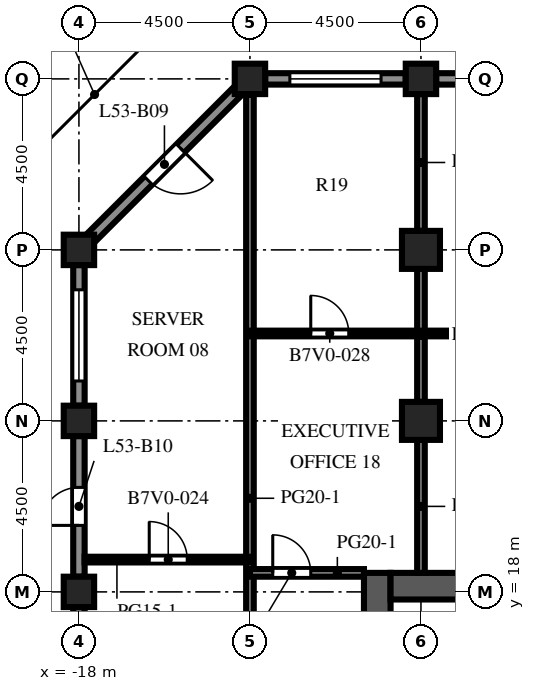
"""IFC4 building model, lengths in metres.
Left out: names, types, materials, properties, quantities, classifications, styles, units other than length and angle.
Written with IfcOpenShell. Run it as: python <this file> out.ifc"""

import sys

from ifc_helpers import new_model, si_unit, direction, frame, frame_2d, origin, origin_2d, place, context, subcontext, project, spatial, rectangle, extrude, element, fill, save


model = new_model("IFC4")
c1 = context("Model", 3, precision=1e-05, world=origin(), true_north=direction((0.0, 1.0)))
c2 = subcontext(c1, "Body", "Model", "MODEL_VIEW")
j1 = project(units=[si_unit("LENGTHUNIT", "METRE"), si_unit("PLANEANGLEUNIT", "RADIAN")], contexts=[c1])
p1 = place(None, origin())
s1 = spatial("IfcSite", under=j1, at=p1, CompositionType="ELEMENT")
p2 = place(p1, origin())
s2 = spatial("IfcBuilding", under=s1, at=p2, CompositionType="ELEMENT")
p3 = place(p2, frame((0.0, 0.0, 235.7)))
s3 = spatial("IfcBuildingStorey", under=s2, at=p3, CompositionType="ELEMENT", Elevation=235.7)
for number, where, z_axis, x_axis in (
    (1, (-18.0, 18.0, 0.0), (0.0, 0.0, 1.0), (1.0, 0.0, 0.0)),
    (2, (-18.0, 22.5, 0.0), (0.0, 0.0, 1.0), (1.0, 0.0, 0.0)),
    (3, (-18.0, 27.0, 0.0), (0.0, 0.0, 1.0), (1.0, 0.0, 0.0)),
    (4, (-13.5, 31.5, 0.0), (0.0, 0.0, 1.0), (1.0, 0.0, 0.0)),
    (5, (-9.0, 31.5, 0.0), (0.0, 0.0, 1.0), (1.0, 0.0, 0.0)),
):
    element("IfcColumn", number, at=place(p3, frame(where, z_axis=z_axis, x_axis=x_axis)), inside=s3, PredefinedType="COLUMN", context=c2, shape_type="SweptSolid", body=[
        extrude(rectangle(XDim=0.8, YDim=0.8, at=origin_2d()), origin(), (0.0, 0.0, 1.0), 4.1),
    ])
for number, where, z_axis, x_axis in (
    (6, (-9.0, 22.5, 0.0), (0.0, 0.0, 1.0), (1.0, 0.0, 0.0)),
    (7, (-9.0, 27.0, 0.0), (0.0, 0.0, 1.0), (1.0, 0.0, 0.0)),
):
    element("IfcColumn", number, at=place(p3, frame(where, z_axis=z_axis, x_axis=x_axis)), inside=s3, PredefinedType="COLUMN", context=c2, shape_type="SweptSolid", body=[
        extrude(rectangle(XDim=1.0, YDim=1.0, at=origin_2d()), origin(), (0.0, 0.0, 1.0), 4.1),
    ])
p4 = place(p3, frame((-10.15, -9.0, 0.0), z_axis=(0.0, 0.0, 1.0), x_axis=(0.0, 1.0, 0.0)))
e8 = element("IfcWall", 8, at=p4, inside=s3, PredefinedType="SHEAR", context=c2, shape_type="SweptSolid", body=[
    extrude(rectangle(XDim=27.5, YDim=0.7, at=frame_2d((13.75, 0.0))), origin(), (0.0, 0.0, 1.0), 4.1),
])
p5 = place(p4, frame((12.55, 0.0, 0.0)))
e9 = element("IfcOpeningElement", 9, at=p5, cuts=e8, PredefinedType="OPENING", context=c2, shape_type="SweptSolid", body=[
    extrude(rectangle(XDim=2.4, YDim=2.4, at=frame_2d((1.2, 1.2))), frame((0.0, 0.36, 0.0), z_axis=(0.0, -1.0, 0.0), x_axis=(1.0, 0.0, 0.0)), (0.0, 0.0, 1.0), 0.72),
])
p6 = place(p4, frame((6.825, 0.0, 0.0)))
e10 = element("IfcOpeningElement", 10, at=p6, cuts=e8, PredefinedType="OPENING", context=c2, shape_type="SweptSolid", body=[
    extrude(rectangle(XDim=1.2, YDim=2.1, at=frame_2d((0.6, 1.05))), frame((0.0, 0.36, 0.0), z_axis=(0.0, -1.0, 0.0), x_axis=(1.0, 0.0, 0.0)), (0.0, 0.0, 1.0), 0.72),
])
p7 = place(p4, frame((19.475, 0.0, 0.0)))
e11 = element("IfcOpeningElement", 11, at=p7, cuts=e8, PredefinedType="OPENING", context=c2, shape_type="SweptSolid", body=[
    extrude(rectangle(XDim=1.2, YDim=2.1, at=frame_2d((0.6, 1.05))), frame((0.0, 0.36, 0.0), z_axis=(0.0, -1.0, 0.0), x_axis=(1.0, 0.0, 0.0)), (0.0, 0.0, 1.0), 0.72),
])
p8 = place(p3, frame((-9.8, 18.15, 0.0), z_axis=(0.0, 0.0, 1.0), x_axis=(1.0, 0.0, 0.0)))
e12 = element("IfcWall", 12, at=p8, inside=s3, PredefinedType="SHEAR", context=c2, shape_type="SweptSolid", body=[
    extrude(rectangle(XDim=10.6, YDim=0.7, at=frame_2d((5.3, 0.0))), origin(), (0.0, 0.0, 1.0), 4.1),
])
p9 = place(p3, frame((-8.6, 31.5, 0.0), z_axis=(0.0, 0.0, 1.0), x_axis=(1.0, 0.0, 0.0)))
e13 = element("IfcWall", 13, at=p9, inside=s3, PredefinedType="SOLIDWALL", context=c2, shape_type="SweptSolid", body=[
    extrude(rectangle(XDim=3.7, YDim=0.3, at=frame_2d((1.85, 0.0))), origin(), (0.0, 0.0, 1.0), 2.85),
])
p10 = place(p9, frame((1.35, 0.0, 0.0)))
e14 = element("IfcOpeningElement", 14, at=p10, cuts=e13, PredefinedType="OPENING", context=c2, shape_type="SweptSolid", body=[
    extrude(rectangle(XDim=1.0, YDim=2.2, at=frame_2d((0.5, 1.1))), frame((0.0, 0.16, 0.0), z_axis=(0.0, -1.0, 0.0), x_axis=(1.0, 0.0, 0.0)), (0.0, 0.0, 1.0), 0.32),
])
p11 = place(p3, frame((-13.1, 31.5, 0.0), z_axis=(0.0, 0.0, 1.0), x_axis=(1.0, 0.0, 0.0)))
e15 = element("IfcWall", 15, at=p11, inside=s3, PredefinedType="SOLIDWALL", context=c2, shape_type="SweptSolid", body=[
    extrude(rectangle(XDim=3.7, YDim=0.3, at=frame_2d((1.85, 0.0))), origin(), (0.0, 0.0, 1.0), 2.85),
])
p12 = place(p11, frame((0.65, 0.0, 0.8)))
e16 = element("IfcOpeningElement", 16, at=p12, cuts=e15, PredefinedType="OPENING", context=c2, shape_type="SweptSolid", body=[
    extrude(rectangle(XDim=2.4, YDim=1.7, at=frame_2d((1.2, 0.85))), frame((0.0, 0.16, 0.0), z_axis=(0.0, -1.0, 0.0), x_axis=(1.0, 0.0, 0.0)), (0.0, 0.0, 1.0), 0.32),
])
p13 = place(p3, frame((-17.706, 27.294, 0.0), z_axis=(0.0, 0.0, 1.0), x_axis=(0.707106781187, 0.707106781187, 0.0)))
e17 = element("IfcWall", 17, at=p13, inside=s3, PredefinedType="SOLIDWALL", context=c2, shape_type="SweptSolid", body=[
    extrude(rectangle(XDim=5.532, YDim=0.3, at=frame_2d((2.766, 0.0))), origin(), (0.0, 0.0, 1.0), 2.85),
])
p14 = place(p13, frame((2.166, 0.0, 0.0)))
e18 = element("IfcOpeningElement", 18, at=p14, cuts=e17, PredefinedType="OPENING", context=c2, shape_type="SweptSolid", body=[
    extrude(rectangle(XDim=1.2, YDim=2.2, at=frame_2d((0.6, 1.1))), frame((0.0, 0.16, 0.0), z_axis=(0.0, -1.0, 0.0), x_axis=(1.0, 0.0, 0.0)), (0.0, 0.0, 1.0), 0.32),
])
p15 = place(p3, frame((-18.0, 22.9, 0.0), z_axis=(0.0, 0.0, 1.0), x_axis=(0.0, 1.0, 0.0)))
e19 = element("IfcWall", 19, at=p15, inside=s3, PredefinedType="SOLIDWALL", context=c2, shape_type="SweptSolid", body=[
    extrude(rectangle(XDim=3.7, YDim=0.3, at=frame_2d((1.85, 0.0))), origin(), (0.0, 0.0, 1.0), 2.85),
])
p16 = place(p15, frame((0.65, 0.0, 0.8)))
e20 = element("IfcOpeningElement", 20, at=p16, cuts=e19, PredefinedType="OPENING", context=c2, shape_type="SweptSolid", body=[
    extrude(rectangle(XDim=2.4, YDim=1.7, at=frame_2d((1.2, 0.85))), frame((0.0, 0.16, 0.0), z_axis=(0.0, -1.0, 0.0), x_axis=(1.0, 0.0, 0.0)), (0.0, 0.0, 1.0), 0.32),
])
p17 = place(p3, frame((-18.0, 18.4, 0.0), z_axis=(0.0, 0.0, 1.0), x_axis=(0.0, 1.0, 0.0)))
e21 = element("IfcWall", 21, at=p17, inside=s3, PredefinedType="SOLIDWALL", context=c2, shape_type="SweptSolid", body=[
    extrude(rectangle(XDim=3.7, YDim=0.3, at=frame_2d((1.85, 0.0))), origin(), (0.0, 0.0, 1.0), 2.85),
])
p18 = place(p17, frame((1.35, 0.0, 0.0)))
e22 = element("IfcOpeningElement", 22, at=p18, cuts=e21, PredefinedType="OPENING", context=c2, shape_type="SweptSolid", body=[
    extrude(rectangle(XDim=1.0, YDim=2.2, at=frame_2d((0.5, 1.1))), frame((0.0, 0.16, 0.0), z_axis=(0.0, -1.0, 0.0), x_axis=(1.0, 0.0, 0.0)), (0.0, 0.0, 1.0), 0.32),
])
p19 = place(p3, frame((-18.0, 13.9, 0.0), z_axis=(0.0, 0.0, 1.0), x_axis=(0.0, 1.0, 0.0)))
e23 = element("IfcWall", 23, at=p19, inside=s3, PredefinedType="SOLIDWALL", context=c2, shape_type="SweptSolid", body=[
    extrude(rectangle(XDim=3.7, YDim=0.3, at=frame_2d((1.85, 0.0))), origin(), (0.0, 0.0, 1.0), 2.85),
])
p20 = place(p19, frame((0.65, 0.0, 0.8)))
e24 = element("IfcOpeningElement", 24, at=p20, cuts=e23, PredefinedType="OPENING", context=c2, shape_type="SweptSolid", body=[
    extrude(rectangle(XDim=2.4, YDim=1.7, at=frame_2d((1.2, 0.85))), frame((0.0, 0.16, 0.0), z_axis=(0.0, -1.0, 0.0), x_axis=(1.0, 0.0, 0.0)), (0.0, 0.0, 1.0), 0.32),
])
p21 = place(p3, frame((-13.5, 6.25, 0.0), z_axis=(0.0, 0.0, 1.0), x_axis=(0.0, 1.0, 0.0)))
e25 = element("IfcWall", 25, at=p21, inside=s3, PredefinedType="PARTITIONING", context=c2, shape_type="SweptSolid", body=[
    extrude(rectangle(XDim=24.827, YDim=0.2, at=frame_2d((12.414, 0.0))), origin(), (0.0, 0.0, 1.0), 3.65),
])
p22 = place(p21, frame((2.6, 0.0, 0.0)))
e26 = element("IfcOpeningElement", 26, at=p22, cuts=e25, PredefinedType="OPENING", context=c2, shape_type="SweptSolid", body=[
    extrude(rectangle(XDim=1.0, YDim=2.1, at=frame_2d((0.5, 1.05))), frame((0.0, 0.11, 0.0), z_axis=(0.0, -1.0, 0.0), x_axis=(1.0, 0.0, 0.0)), (0.0, 0.0, 1.0), 0.22),
])
for number, where, z_axis, x_axis in (
    (27, (-9.0, 18.5, 0.0), (0.0, 0.0, 1.0), (0.0, 1.0, 0.0)),
    (28, (-9.0, 23.0, 0.0), (0.0, 0.0, 1.0), (0.0, 1.0, 0.0)),
):
    element("IfcWall", number, at=place(p3, frame(where, z_axis=z_axis, x_axis=x_axis)), inside=s3, PredefinedType="PARTITIONING", context=c2, shape_type="SweptSolid", body=[
        extrude(rectangle(XDim=3.5, YDim=0.2, at=frame_2d((1.75, 0.0))), origin(), (0.0, 0.0, 1.0), 3.65),
    ])
p23 = place(p3, frame((-9.0, 27.5, 0.0), z_axis=(0.0, 0.0, 1.0), x_axis=(0.0, 1.0, 0.0)))
e29 = element("IfcWall", 29, at=p23, inside=s3, PredefinedType="PARTITIONING", context=c2, shape_type="SweptSolid", body=[
    extrude(rectangle(XDim=3.6, YDim=0.2, at=frame_2d((1.8, 0.0))), origin(), (0.0, 0.0, 1.0), 3.65),
])
p24 = place(p3, frame((-13.5, 18.5, 0.0), z_axis=(0.0, 0.0, 1.0), x_axis=(1.0, 0.0, 0.0)))
e30 = element("IfcWall", 30, at=p24, inside=s3, PredefinedType="PARTITIONING", context=c2, shape_type="SweptSolid", body=[
    extrude(rectangle(XDim=3.0, YDim=0.2, at=frame_2d((1.5, 0.0))), origin(), (0.0, 0.0, 1.0), 3.65),
])
p25 = place(p24, frame((0.6, 0.0, 0.0)))
e31 = element("IfcOpeningElement", 31, at=p25, cuts=e30, PredefinedType="OPENING", context=c2, shape_type="SweptSolid", body=[
    extrude(rectangle(XDim=1.0, YDim=2.1, at=frame_2d((0.5, 1.05))), frame((0.0, 0.11, 0.0), z_axis=(0.0, -1.0, 0.0), x_axis=(1.0, 0.0, 0.0)), (0.0, 0.0, 1.0), 0.22),
])
p26 = place(p3, frame((-17.85, 18.85, 0.0), z_axis=(0.0, 0.0, 1.0), x_axis=(1.0, 0.0, 0.0)))
e32 = element("IfcWall", 32, at=p26, inside=s3, PredefinedType="PARTITIONING", context=c2, shape_type="SweptSolid", body=[
    extrude(rectangle(XDim=4.35, YDim=0.15, at=frame_2d((2.175, 0.0))), origin(), (0.0, 0.0, 1.0), 3.65),
])
p27 = place(p26, frame((1.7, 0.0, 0.0)))
e33 = element("IfcOpeningElement", 33, at=p27, cuts=e32, PredefinedType="OPENING", context=c2, shape_type="SweptSolid", body=[
    extrude(rectangle(XDim=1.0, YDim=2.1, at=frame_2d((0.5, 1.05))), frame((0.0, 0.085, 0.0), z_axis=(0.0, -1.0, 0.0), x_axis=(1.0, 0.0, 0.0)), (0.0, 0.0, 1.0), 0.17),
])
p28 = place(p3, frame((-13.5, 24.8, 0.0), z_axis=(0.0, 0.0, 1.0), x_axis=(1.0, 0.0, 0.0)))
e34 = element("IfcWall", 34, at=p28, inside=s3, PredefinedType="PARTITIONING", context=c2, shape_type="SweptSolid", body=[
    extrude(rectangle(XDim=34.5, YDim=0.15, at=frame_2d((17.25, 0.0))), origin(), (0.0, 0.0, 1.0), 3.65),
])
p29 = place(p28, frame((1.6, 0.0, 0.0)))
e35 = element("IfcOpeningElement", 35, at=p29, cuts=e34, PredefinedType="OPENING", context=c2, shape_type="SweptSolid", body=[
    extrude(rectangle(XDim=1.0, YDim=2.1, at=frame_2d((0.5, 1.05))), frame((0.0, 0.085, 0.0), z_axis=(0.0, -1.0, 0.0), x_axis=(1.0, 0.0, 0.0)), (0.0, 0.0, 1.0), 0.17),
])
p30 = place(p28, frame((10.35, 0.0, 0.0)))
e36 = element("IfcOpeningElement", 36, at=p30, cuts=e34, PredefinedType="OPENING", context=c2, shape_type="SweptSolid", body=[
    extrude(rectangle(XDim=1.0, YDim=2.1, at=frame_2d((0.5, 1.05))), frame((0.0, 0.085, 0.0), z_axis=(0.0, -1.0, 0.0), x_axis=(1.0, 0.0, 0.0)), (0.0, 0.0, 1.0), 0.17),
])
p31 = place(p28, frame((22.35, 0.0, 0.0)))
e37 = element("IfcOpeningElement", 37, at=p31, cuts=e34, PredefinedType="OPENING", context=c2, shape_type="SweptSolid", body=[
    extrude(rectangle(XDim=1.0, YDim=2.1, at=frame_2d((0.5, 1.05))), frame((0.0, 0.085, 0.0), z_axis=(0.0, -1.0, 0.0), x_axis=(1.0, 0.0, 0.0)), (0.0, 0.0, 1.0), 0.17),
])
p32 = place(p28, frame((31.1, 0.0, 0.0)))
e38 = element("IfcOpeningElement", 38, at=p32, cuts=e34, PredefinedType="OPENING", context=c2, shape_type="SweptSolid", body=[
    extrude(rectangle(XDim=1.0, YDim=2.1, at=frame_2d((0.5, 1.05))), frame((0.0, 0.085, 0.0), z_axis=(0.0, -1.0, 0.0), x_axis=(1.0, 0.0, 0.0)), (0.0, 0.0, 1.0), 0.17),
])
p33 = place(p12, origin())
e39 = element("IfcWindow", 39, at=p33, inside=s3, PartitioningType="SINGLE_PANEL", PredefinedType="WINDOW", context=c2, shape_type="SweptSolid", body=[
    extrude(rectangle(XDim=2.4, YDim=1.7, at=frame_2d((1.2, 0.85))), frame((0.0, 0.03, 0.0), z_axis=(0.0, -1.0, 0.0), x_axis=(1.0, 0.0, 0.0)), (0.0, 0.0, 1.0), 0.06),
])
fill(e16, e39)
p34 = place(p14, origin())
e40 = element("IfcDoor", 40, at=p34, inside=s3, OperationType="SINGLE_SWING_RIGHT", PredefinedType="DOOR", context=c2, shape_type="SweptSolid", body=[
    extrude(rectangle(XDim=1.2, YDim=2.2, at=frame_2d((0.6, 1.1))), frame((0.0, 0.025, 0.0), z_axis=(0.0, -1.0, 0.0), x_axis=(1.0, 0.0, 0.0)), (0.0, 0.0, 1.0), 0.05),
])
fill(e18, e40)
p35 = place(p16, origin())
e41 = element("IfcWindow", 41, at=p35, inside=s3, PartitioningType="SINGLE_PANEL", PredefinedType="WINDOW", context=c2, shape_type="SweptSolid", body=[
    extrude(rectangle(XDim=2.4, YDim=1.7, at=frame_2d((1.2, 0.85))), frame((0.0, 0.03, 0.0), z_axis=(0.0, -1.0, 0.0), x_axis=(1.0, 0.0, 0.0)), (0.0, 0.0, 1.0), 0.06),
])
fill(e20, e41)
p36 = place(p18, origin())
e42 = element("IfcDoor", 42, at=p36, inside=s3, OperationType="SINGLE_SWING_LEFT", PredefinedType="DOOR", context=c2, shape_type="SweptSolid", body=[
    extrude(rectangle(XDim=1.0, YDim=2.2, at=frame_2d((0.5, 1.1))), frame((0.0, 0.025, 0.0), z_axis=(0.0, -1.0, 0.0), x_axis=(1.0, 0.0, 0.0)), (0.0, 0.0, 1.0), 0.05),
])
fill(e22, e42)
p37 = place(p25, origin())
e43 = element("IfcDoor", 43, at=p37, inside=s3, OperationType="SINGLE_SWING_LEFT", PredefinedType="DOOR", context=c2, shape_type="SweptSolid", body=[
    extrude(rectangle(XDim=1.0, YDim=2.1, at=frame_2d((0.5, 1.05))), frame((0.0, 0.025, 0.0), z_axis=(0.0, -1.0, 0.0), x_axis=(1.0, 0.0, 0.0)), (0.0, 0.0, 1.0), 0.05),
])
fill(e31, e43)
p38 = place(p27, origin())
e44 = element("IfcDoor", 44, at=p38, inside=s3, OperationType="SINGLE_SWING_LEFT", PredefinedType="DOOR", context=c2, shape_type="SweptSolid", body=[
    extrude(rectangle(XDim=1.0, YDim=2.1, at=frame_2d((0.5, 1.05))), frame((0.0, 0.025, 0.0), z_axis=(0.0, -1.0, 0.0), x_axis=(1.0, 0.0, 0.0)), (0.0, 0.0, 1.0), 0.05),
])
fill(e33, e44)
p39 = place(p29, origin())
e45 = element("IfcDoor", 45, at=p39, inside=s3, OperationType="SINGLE_SWING_LEFT", PredefinedType="DOOR", context=c2, shape_type="SweptSolid", body=[
    extrude(rectangle(XDim=1.0, YDim=2.1, at=frame_2d((0.5, 1.05))), frame((0.0, 0.025, 0.0), z_axis=(0.0, -1.0, 0.0), x_axis=(1.0, 0.0, 0.0)), (0.0, 0.0, 1.0), 0.05),
])
fill(e35, e45)
save(model, sys.argv[1])
